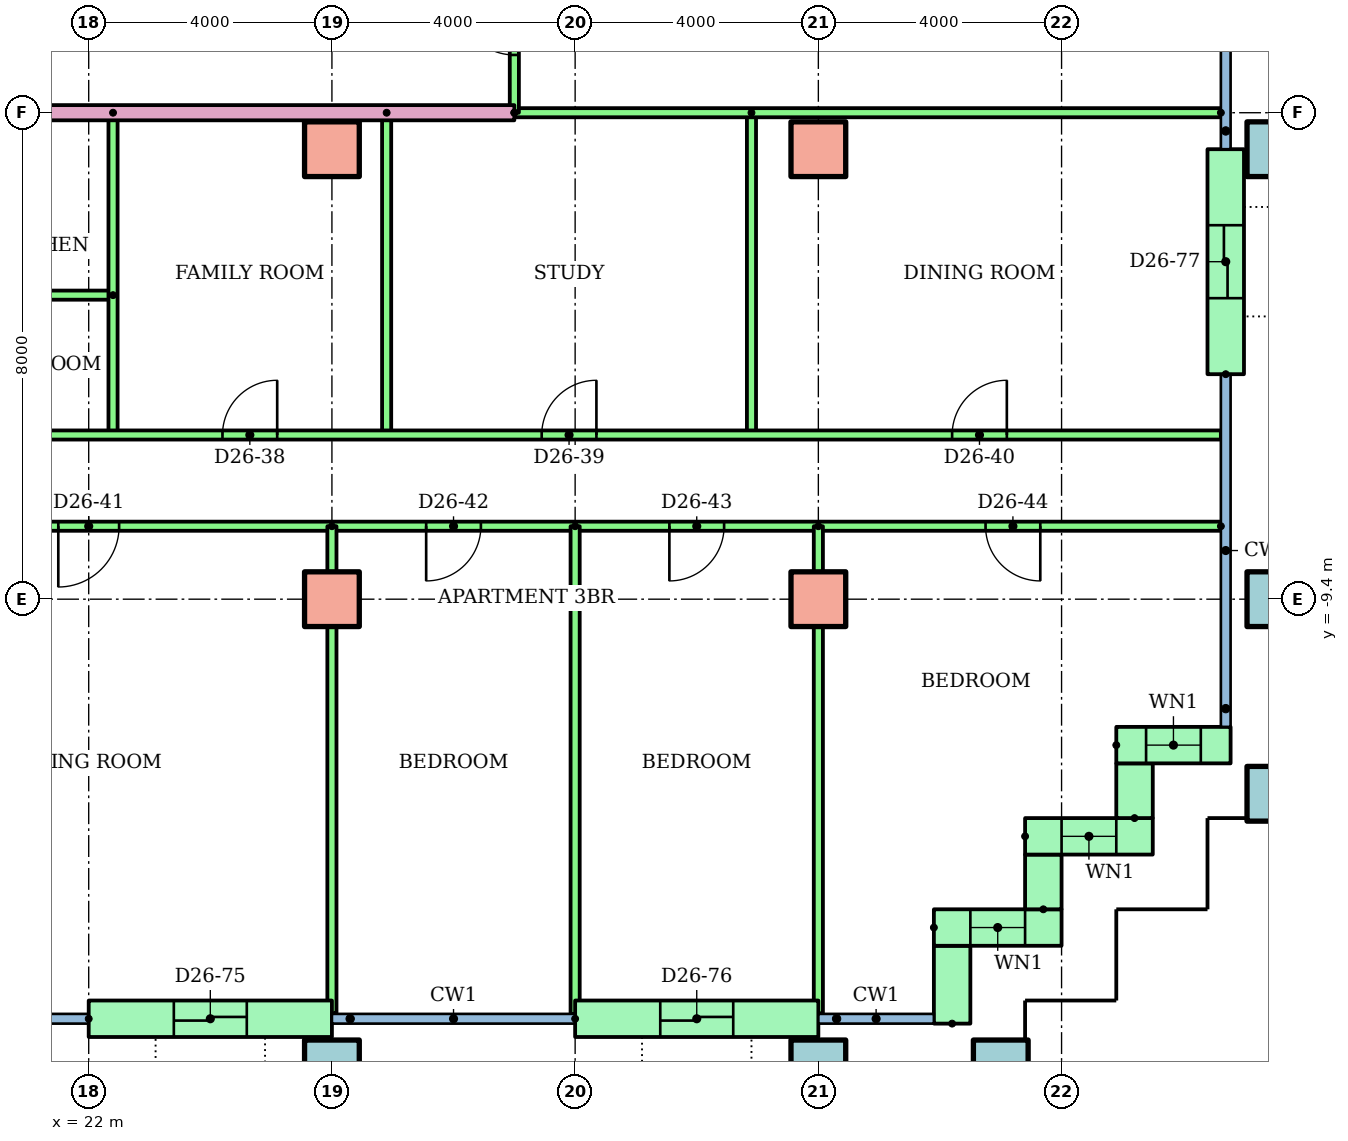
"""IFC4 building model, lengths in metres.
Left out: names, types, materials, properties, quantities, classifications, styles, units other than length and angle.
Written with IfcOpenShell. Run it as: python <this file> out.ifc"""

import sys

from ifc_helpers import new_model, si_unit, direction, frame, frame_2d, origin, origin_2d, place, context, subcontext, project, spatial, rectangle, hollow_rectangle, extrude, element, fill, save


model = new_model("IFC4")
c1 = context("Model", 3, precision=1e-05, world=origin(), true_north=direction((0.0, 1.0)))
c2 = subcontext(c1, "Body", "Model", "MODEL_VIEW")
j1 = project(units=[si_unit("LENGTHUNIT", "METRE"), si_unit("PLANEANGLEUNIT", "RADIAN")], contexts=[c1])
p1 = place(None, origin())
s1 = spatial("IfcSite", under=j1, at=p1, CompositionType="ELEMENT")
p2 = place(p1, origin())
s2 = spatial("IfcBuilding", under=s1, at=p2, CompositionType="ELEMENT")
p3 = place(p2, frame((0.0, 0.0, 99.9)))
s3 = spatial("IfcBuildingStorey", under=s2, at=p3, CompositionType="ELEMENT", Elevation=99.9)
for number, where in (
    (1, (26.0, -17.1, 0.0)),
    (2, (34.0, -17.1, 0.0)),
    (3, (37.0, -17.1, 0.0)),
    (4, (41.5, -12.6, 0.0)),
):
    element("IfcColumn", number, at=place(p3, frame(where)), inside=s3, PredefinedType="COLUMN", context=c2, shape_type="SweptSolid", body=[
        extrude(hollow_rectangle(XDim=0.9, YDim=0.9, WallThickness=0.045, at=origin_2d()), origin(), (0.0, 0.0, 1.0), 3.2),
    ])
for number, where in (
    (5, (26.0, -9.4, 0.0)),
    (6, (34.0, -9.4, 0.0)),
):
    element("IfcColumn", number, at=place(p3, frame(where)), inside=s3, PredefinedType="COLUMN", context=c2, shape_type="SweptSolid", body=[
        extrude(rectangle(XDim=0.9, YDim=0.9, at=origin_2d()), origin(), (0.0, 0.0, 1.0), 3.2),
    ])
p4 = place(p3, frame((41.5, -9.4, 0.0)))
e7 = element("IfcColumn", 7, at=p4, inside=s3, PredefinedType="COLUMN", context=c2, shape_type="SweptSolid", body=[
    extrude(hollow_rectangle(XDim=0.9, YDim=0.9, WallThickness=0.045, at=origin_2d()), origin(), (0.0, 0.0, 1.0), 3.2),
])
for number, where in (
    (8, (26.0, -2.0, 0.0)),
    (9, (34.0, -2.0, 0.0)),
):
    element("IfcColumn", number, at=place(p3, frame(where)), inside=s3, PredefinedType="COLUMN", context=c2, shape_type="SweptSolid", body=[
        extrude(rectangle(XDim=0.9, YDim=0.9, at=origin_2d()), origin(), (0.0, 0.0, 1.0), 3.2),
    ])
p5 = place(p3, frame((41.5, -2.0, 0.0)))
e10 = element("IfcColumn", 10, at=p5, inside=s3, PredefinedType="COLUMN", context=c2, shape_type="SweptSolid", body=[
    extrude(hollow_rectangle(XDim=0.9, YDim=0.9, WallThickness=0.045, at=origin_2d()), origin(), (0.0, 0.0, 1.0), 3.2),
])
p6 = place(p3, frame((22.0, -16.3, 0.0)))
e11 = element("IfcWall", 11, at=p6, inside=s3, PredefinedType="STANDARD", context=c2, shape_type="SweptSolid", body=[
    extrude(rectangle(XDim=4.0, YDim=0.6, at=frame_2d((2.0, 0.0))), origin(), (0.0, 0.0, 1.0), 2.92),
])
p7 = place(p6, frame((1.4, 0.0, 0.0)))
e12 = element("IfcOpeningElement", 12, at=p7, cuts=e11, PredefinedType="OPENING", context=c2, shape_type="SweptSolid", body=[
    extrude(rectangle(XDim=1.2, YDim=2.1, at=frame_2d((0.6, 1.05))), frame((0.0, 0.31, 0.0), z_axis=(0.0, -1.0, 0.0), x_axis=(1.0, 0.0, 0.0)), (0.0, 0.0, 1.0), 0.62),
])
p8 = place(p3, frame((30.0, -16.3, 0.0)))
e13 = element("IfcWall", 13, at=p8, inside=s3, PredefinedType="STANDARD", context=c2, shape_type="SweptSolid", body=[
    extrude(rectangle(XDim=4.0, YDim=0.6, at=frame_2d((2.0, 0.0))), origin(), (0.0, 0.0, 1.0), 2.92),
])
p9 = place(p8, frame((1.4, 0.0, 0.0)))
e14 = element("IfcOpeningElement", 14, at=p9, cuts=e13, PredefinedType="OPENING", context=c2, shape_type="SweptSolid", body=[
    extrude(rectangle(XDim=1.2, YDim=2.1, at=frame_2d((0.6, 1.05))), frame((0.0, 0.31, 0.0), z_axis=(0.0, -1.0, 0.0), x_axis=(1.0, 0.0, 0.0)), (0.0, 0.0, 1.0), 0.62),
])
p10 = place(p3, frame((36.2, -16.38, 0.0), z_axis=(0.0, 0.0, 1.0), x_axis=(0.0, 1.0, 0.0)))
e15 = element("IfcWall", 15, at=p10, inside=s3, PredefinedType="STANDARD", context=c2, shape_type="SweptSolid", body=[
    extrude(rectangle(XDim=1.28, YDim=0.6, at=frame_2d((0.64, 0.0))), origin(), (0.0, 0.0, 1.0), 2.92),
])
p11 = place(p3, frame((35.9, -14.8, 0.0)))
e16 = element("IfcWall", 16, at=p11, inside=s3, PredefinedType="STANDARD", context=c2, shape_type="SweptSolid", body=[
    extrude(rectangle(XDim=2.1, YDim=0.6, at=frame_2d((1.05, 0.0))), origin(), (0.0, 0.0, 1.0), 2.92),
])
p12 = place(p11, frame((0.6, 0.0, 0.9)))
e17 = element("IfcOpeningElement", 17, at=p12, cuts=e16, PredefinedType="OPENING", context=c2, shape_type="SweptSolid", body=[
    extrude(rectangle(XDim=0.9, YDim=1.5, at=frame_2d((0.45, 0.75))), frame((0.0, 0.31, 0.0), z_axis=(0.0, -1.0, 0.0), x_axis=(1.0, 0.0, 0.0)), (0.0, 0.0, 1.0), 0.62),
])
p13 = place(p3, frame((37.7, -14.5, 0.0), z_axis=(0.0, 0.0, 1.0), x_axis=(0.0, 1.0, 0.0)))
e18 = element("IfcWall", 18, at=p13, inside=s3, PredefinedType="STANDARD", context=c2, shape_type="SweptSolid", body=[
    extrude(rectangle(XDim=0.9, YDim=0.6, at=frame_2d((0.45, 0.0))), origin(), (0.0, 0.0, 1.0), 2.92),
])
p14 = place(p3, frame((37.4, -13.3, 0.0)))
e19 = element("IfcWall", 19, at=p14, inside=s3, PredefinedType="STANDARD", context=c2, shape_type="SweptSolid", body=[
    extrude(rectangle(XDim=2.1, YDim=0.6, at=frame_2d((1.05, 0.0))), origin(), (0.0, 0.0, 1.0), 2.92),
])
p15 = place(p14, frame((0.6, 0.0, 0.9)))
e20 = element("IfcOpeningElement", 20, at=p15, cuts=e19, PredefinedType="OPENING", context=c2, shape_type="SweptSolid", body=[
    extrude(rectangle(XDim=0.9, YDim=1.5, at=frame_2d((0.45, 0.75))), frame((0.0, 0.31, 0.0), z_axis=(0.0, -1.0, 0.0), x_axis=(1.0, 0.0, 0.0)), (0.0, 0.0, 1.0), 0.62),
])
p16 = place(p3, frame((39.2, -13.0, 0.0), z_axis=(0.0, 0.0, 1.0), x_axis=(0.0, 1.0, 0.0)))
e21 = element("IfcWall", 21, at=p16, inside=s3, PredefinedType="STANDARD", context=c2, shape_type="SweptSolid", body=[
    extrude(rectangle(XDim=0.9, YDim=0.6, at=frame_2d((0.45, 0.0))), origin(), (0.0, 0.0, 1.0), 2.92),
])
p17 = place(p3, frame((38.9, -11.8, 0.0)))
e22 = element("IfcWall", 22, at=p17, inside=s3, PredefinedType="STANDARD", context=c2, shape_type="SweptSolid", body=[
    extrude(rectangle(XDim=1.88, YDim=0.6, at=frame_2d((0.94, 0.0))), origin(), (0.0, 0.0, 1.0), 2.92),
])
p18 = place(p17, frame((0.49, 0.0, 0.9)))
e23 = element("IfcOpeningElement", 23, at=p18, cuts=e22, PredefinedType="OPENING", context=c2, shape_type="SweptSolid", body=[
    extrude(rectangle(XDim=0.9, YDim=1.5, at=frame_2d((0.45, 0.75))), frame((0.0, 0.31, 0.0), z_axis=(0.0, -1.0, 0.0), x_axis=(1.0, 0.0, 0.0)), (0.0, 0.0, 1.0), 0.62),
])
p19 = place(p3, frame((40.7, -5.7, 0.0), z_axis=(0.0, 0.0, 1.0), x_axis=(0.0, 1.0, 0.0)))
e24 = element("IfcWall", 24, at=p19, inside=s3, PredefinedType="STANDARD", context=c2, shape_type="SweptSolid", body=[
    extrude(rectangle(XDim=3.7, YDim=0.6, at=frame_2d((1.85, 0.0))), origin(), (0.0, 0.0, 1.0), 2.92),
])
p20 = place(p19, frame((1.25, 0.0, 0.0)))
e25 = element("IfcOpeningElement", 25, at=p20, cuts=e24, PredefinedType="OPENING", context=c2, shape_type="SweptSolid", body=[
    extrude(rectangle(XDim=1.2, YDim=2.1, at=frame_2d((0.6, 1.05))), frame((0.0, 0.31, 0.0), z_axis=(0.0, -1.0, 0.0), x_axis=(1.0, 0.0, 0.0)), (0.0, 0.0, 1.0), 0.62),
])
p21 = place(p3, frame((22.4, -4.4, 0.0), z_axis=(0.0, 0.0, 1.0), x_axis=(-1.0, 0.0, 0.0)))
e26 = element("IfcWall", 26, at=p21, inside=s3, PredefinedType="PARTITIONING", context=c2, shape_type="SweptSolid", body=[
    extrude(rectangle(XDim=2.4, YDim=0.15, at=frame_2d((1.2, 0.0))), origin(), (0.0, 0.0, 1.0), 2.4),
])
for number, where, z_axis, x_axis in (
    (27, (22.4, -1.4, 0.0), (0.0, 0.0, 1.0), (0.0, -1.0, 0.0)),
    (28, (26.9, -1.4, 0.0), (0.0, 0.0, 1.0), (0.0, -1.0, 0.0)),
    (29, (32.9, -1.4, 0.0), (0.0, 0.0, 1.0), (0.0, -1.0, 0.0)),
):
    element("IfcWall", number, at=place(p3, frame(where, z_axis=z_axis, x_axis=x_axis)), inside=s3, PredefinedType="PARTITIONING", context=c2, shape_type="SweptSolid", body=[
        extrude(rectangle(XDim=5.3, YDim=0.15, at=frame_2d((2.65, 0.0))), origin(), (0.0, 0.0, 1.0), 2.4),
    ])
p22 = place(p3, frame((20.0, -6.7, 0.0)))
e30 = element("IfcWall", 30, at=p22, inside=s3, PredefinedType="PARTITIONING", context=c2, shape_type="SweptSolid", body=[
    extrude(rectangle(XDim=20.62, YDim=0.15, at=frame_2d((10.31, 0.0))), origin(), (0.0, 0.0, 1.0), 2.4),
])
p23 = place(p22, frame((4.2, 0.0, 0.0)))
e31 = element("IfcOpeningElement", 31, at=p23, cuts=e30, PredefinedType="OPENING", context=c2, shape_type="SweptSolid", body=[
    extrude(rectangle(XDim=0.9, YDim=2.1, at=frame_2d((0.45, 1.05))), frame((0.0, 0.085, 0.0), z_axis=(0.0, -1.0, 0.0), x_axis=(1.0, 0.0, 0.0)), (0.0, 0.0, 1.0), 0.17),
])
p24 = place(p22, frame((9.45, 0.0, 0.0)))
e32 = element("IfcOpeningElement", 32, at=p24, cuts=e30, PredefinedType="OPENING", context=c2, shape_type="SweptSolid", body=[
    extrude(rectangle(XDim=0.9, YDim=2.1, at=frame_2d((0.45, 1.05))), frame((0.0, 0.085, 0.0), z_axis=(0.0, -1.0, 0.0), x_axis=(1.0, 0.0, 0.0)), (0.0, 0.0, 1.0), 0.17),
])
p25 = place(p22, frame((16.2, 0.0, 0.0)))
e33 = element("IfcOpeningElement", 33, at=p25, cuts=e30, PredefinedType="OPENING", context=c2, shape_type="SweptSolid", body=[
    extrude(rectangle(XDim=0.9, YDim=2.1, at=frame_2d((0.45, 1.05))), frame((0.0, 0.085, 0.0), z_axis=(0.0, -1.0, 0.0), x_axis=(1.0, 0.0, 0.0)), (0.0, 0.0, 1.0), 0.17),
])
p26 = place(p3, frame((40.62, -8.2, 0.0), z_axis=(0.0, 0.0, 1.0), x_axis=(-1.0, 0.0, 0.0)))
e34 = element("IfcWall", 34, at=p26, inside=s3, PredefinedType="PARTITIONING", context=c2, shape_type="SweptSolid", body=[
    extrude(rectangle(XDim=22.62, YDim=0.15, at=frame_2d((11.31, 0.0))), origin(), (0.0, 0.0, 1.0), 2.4),
])
p27 = place(p26, frame((18.12, 0.0, 0.0)))
e35 = element("IfcOpeningElement", 35, at=p27, cuts=e34, PredefinedType="OPENING", context=c2, shape_type="SweptSolid", body=[
    extrude(rectangle(XDim=1.0, YDim=2.1, at=frame_2d((0.5, 1.05))), frame((0.0, 0.085, 0.0), z_axis=(0.0, -1.0, 0.0), x_axis=(1.0, 0.0, 0.0)), (0.0, 0.0, 1.0), 0.17),
])
p28 = place(p26, frame((12.17, 0.0, 0.0)))
e36 = element("IfcOpeningElement", 36, at=p28, cuts=e34, PredefinedType="OPENING", context=c2, shape_type="SweptSolid", body=[
    extrude(rectangle(XDim=0.9, YDim=2.1, at=frame_2d((0.45, 1.05))), frame((0.0, 0.085, 0.0), z_axis=(0.0, -1.0, 0.0), x_axis=(1.0, 0.0, 0.0)), (0.0, 0.0, 1.0), 0.17),
])
p29 = place(p26, frame((8.17, 0.0, 0.0)))
e37 = element("IfcOpeningElement", 37, at=p29, cuts=e34, PredefinedType="OPENING", context=c2, shape_type="SweptSolid", body=[
    extrude(rectangle(XDim=0.9, YDim=2.1, at=frame_2d((0.45, 1.05))), frame((0.0, 0.085, 0.0), z_axis=(0.0, -1.0, 0.0), x_axis=(1.0, 0.0, 0.0)), (0.0, 0.0, 1.0), 0.17),
])
p30 = place(p26, frame((2.97, 0.0, 0.0)))
e38 = element("IfcOpeningElement", 38, at=p30, cuts=e34, PredefinedType="OPENING", context=c2, shape_type="SweptSolid", body=[
    extrude(rectangle(XDim=0.9, YDim=2.1, at=frame_2d((0.45, 1.05))), frame((0.0, 0.085, 0.0), z_axis=(0.0, -1.0, 0.0), x_axis=(1.0, 0.0, 0.0)), (0.0, 0.0, 1.0), 0.17),
])
p31 = place(p3, frame((26.0, -8.2, 0.0), z_axis=(0.0, 0.0, 1.0), x_axis=(0.0, -1.0, 0.0)))
e39 = element("IfcWall", 39, at=p31, inside=s3, PredefinedType="PARTITIONING", context=c2, shape_type="SweptSolid", body=[
    extrude(rectangle(XDim=8.01, YDim=0.15, at=frame_2d((4.005, 0.0))), origin(), (0.0, 0.0, 1.0), 2.4),
])
p32 = place(p3, frame((30.0, -8.2, 0.0), z_axis=(0.0, 0.0, 1.0), x_axis=(0.0, -1.0, 0.0)))
e40 = element("IfcWall", 40, at=p32, inside=s3, PredefinedType="PARTITIONING", context=c2, shape_type="SweptSolid", body=[
    extrude(rectangle(XDim=8.021, YDim=0.15, at=frame_2d((4.01, 0.0))), origin(), (0.0, 0.0, 1.0), 2.4),
])
p33 = place(p3, frame((34.0, -8.2, 0.0), z_axis=(0.0, 0.0, 1.0), x_axis=(0.0, -1.0, 0.0)))
e41 = element("IfcWall", 41, at=p33, inside=s3, PredefinedType="PARTITIONING", context=c2, shape_type="SweptSolid", body=[
    extrude(rectangle(XDim=8.01, YDim=0.15, at=frame_2d((4.005, 0.0))), origin(), (0.0, 0.0, 1.0), 2.4),
])
p34 = place(p3, frame((29.0, -1.4, 0.0), z_axis=(0.0, 0.0, 1.0), x_axis=(-1.0, 0.0, 0.0)))
e42 = element("IfcWall", 42, at=p34, inside=s3, PredefinedType="PARTITIONING", context=c2, shape_type="SweptSolid", body=[
    extrude(rectangle(XDim=15.0, YDim=0.25, at=frame_2d((7.5, 0.0))), origin(), (0.0, 0.0, 1.0), 2.4),
])
p35 = place(p34, frame((9.311, 0.0, 0.0)))
e43 = element("IfcOpeningElement", 43, at=p35, cuts=e42, PredefinedType="OPENING", context=c2, shape_type="SweptSolid", body=[
    extrude(rectangle(XDim=1.0, YDim=2.1, at=frame_2d((0.5, 1.05))), frame((0.0, 0.135, 0.0), z_axis=(0.0, -1.0, 0.0), x_axis=(1.0, 0.0, 0.0)), (0.0, 0.0, 1.0), 0.27),
])
p36 = place(p3, frame((40.62, -1.4, 0.0), z_axis=(0.0, 0.0, 1.0), x_axis=(-1.0, 0.0, 0.0)))
e44 = element("IfcWall", 44, at=p36, inside=s3, PredefinedType="PARTITIONING", context=c2, shape_type="SweptSolid", body=[
    extrude(rectangle(XDim=11.62, YDim=0.15, at=frame_2d((5.81, 0.0))), origin(), (0.0, 0.0, 1.0), 2.4),
])
p37 = place(p3, frame((29.0, -1.4, 0.0), z_axis=(0.0, 0.0, 1.0), x_axis=(0.0, 1.0, 0.0)))
e45 = element("IfcWall", 45, at=p37, inside=s3, PredefinedType="PARTITIONING", context=c2, shape_type="SweptSolid", body=[
    extrude(rectangle(XDim=2.8, YDim=0.15, at=frame_2d((1.4, 0.0))), origin(), (0.0, 0.0, 1.0), 2.4),
])
p38 = place(p37, frame((0.95, 0.0, 0.0)))
e46 = element("IfcOpeningElement", 46, at=p38, cuts=e45, PredefinedType="OPENING", context=c2, shape_type="SweptSolid", body=[
    extrude(rectangle(XDim=0.9, YDim=2.1, at=frame_2d((0.45, 1.05))), frame((0.0, 0.085, 0.0), z_axis=(0.0, -1.0, 0.0), x_axis=(1.0, 0.0, 0.0)), (0.0, 0.0, 1.0), 0.17),
])
p39 = place(p12, origin())
e47 = element("IfcWindow", 47, at=p39, inside=s3, PartitioningType="SINGLE_PANEL", PredefinedType="WINDOW", context=c2, shape_type="SweptSolid", body=[
    extrude(rectangle(XDim=0.9, YDim=1.5, at=frame_2d((0.45, 0.75))), frame((0.0, 0.03, 0.0), z_axis=(0.0, -1.0, 0.0), x_axis=(1.0, 0.0, 0.0)), (0.0, 0.0, 1.0), 0.06),
])
fill(e17, e47)
p40 = place(p15, origin())
e48 = element("IfcWindow", 48, at=p40, inside=s3, PartitioningType="SINGLE_PANEL", PredefinedType="WINDOW", context=c2, shape_type="SweptSolid", body=[
    extrude(rectangle(XDim=0.9, YDim=1.5, at=frame_2d((0.45, 0.75))), frame((0.0, 0.03, 0.0), z_axis=(0.0, -1.0, 0.0), x_axis=(1.0, 0.0, 0.0)), (0.0, 0.0, 1.0), 0.06),
])
fill(e20, e48)
p41 = place(p18, origin())
e49 = element("IfcWindow", 49, at=p41, inside=s3, PartitioningType="SINGLE_PANEL", PredefinedType="WINDOW", context=c2, shape_type="SweptSolid", body=[
    extrude(rectangle(XDim=0.9, YDim=1.5, at=frame_2d((0.45, 0.75))), frame((0.0, 0.03, 0.0), z_axis=(0.0, -1.0, 0.0), x_axis=(1.0, 0.0, 0.0)), (0.0, 0.0, 1.0), 0.06),
])
fill(e23, e49)
p42 = place(p23, origin())
e50 = element("IfcDoor", 50, at=p42, inside=s3, OperationType="SINGLE_SWING_RIGHT", PredefinedType="DOOR", context=c2, shape_type="SweptSolid", body=[
    extrude(rectangle(XDim=0.9, YDim=2.1, at=frame_2d((0.45, 1.05))), frame((0.0, 0.025, 0.0), z_axis=(0.0, -1.0, 0.0), x_axis=(1.0, 0.0, 0.0)), (0.0, 0.0, 1.0), 0.05),
])
fill(e31, e50)
p43 = place(p24, origin())
e51 = element("IfcDoor", 51, at=p43, inside=s3, OperationType="SINGLE_SWING_RIGHT", PredefinedType="DOOR", context=c2, shape_type="SweptSolid", body=[
    extrude(rectangle(XDim=0.9, YDim=2.1, at=frame_2d((0.45, 1.05))), frame((0.0, 0.025, 0.0), z_axis=(0.0, -1.0, 0.0), x_axis=(1.0, 0.0, 0.0)), (0.0, 0.0, 1.0), 0.05),
])
fill(e32, e51)
p44 = place(p25, origin())
e52 = element("IfcDoor", 52, at=p44, inside=s3, OperationType="SINGLE_SWING_RIGHT", PredefinedType="DOOR", context=c2, shape_type="SweptSolid", body=[
    extrude(rectangle(XDim=0.9, YDim=2.1, at=frame_2d((0.45, 1.05))), frame((0.0, 0.025, 0.0), z_axis=(0.0, -1.0, 0.0), x_axis=(1.0, 0.0, 0.0)), (0.0, 0.0, 1.0), 0.05),
])
fill(e33, e52)
p45 = place(p27, origin())
e53 = element("IfcDoor", 53, at=p45, inside=s3, OperationType="SINGLE_SWING_RIGHT", PredefinedType="DOOR", context=c2, shape_type="SweptSolid", body=[
    extrude(rectangle(XDim=1.0, YDim=2.1, at=frame_2d((0.5, 1.05))), frame((0.0, 0.025, 0.0), z_axis=(0.0, -1.0, 0.0), x_axis=(1.0, 0.0, 0.0)), (0.0, 0.0, 1.0), 0.05),
])
fill(e35, e53)
p46 = place(p28, origin())
e54 = element("IfcDoor", 54, at=p46, inside=s3, OperationType="SINGLE_SWING_RIGHT", PredefinedType="DOOR", context=c2, shape_type="SweptSolid", body=[
    extrude(rectangle(XDim=0.9, YDim=2.1, at=frame_2d((0.45, 1.05))), frame((0.0, 0.025, 0.0), z_axis=(0.0, -1.0, 0.0), x_axis=(1.0, 0.0, 0.0)), (0.0, 0.0, 1.0), 0.05),
])
fill(e36, e54)
p47 = place(p29, origin())
e55 = element("IfcDoor", 55, at=p47, inside=s3, OperationType="SINGLE_SWING_RIGHT", PredefinedType="DOOR", context=c2, shape_type="SweptSolid", body=[
    extrude(rectangle(XDim=0.9, YDim=2.1, at=frame_2d((0.45, 1.05))), frame((0.0, 0.025, 0.0), z_axis=(0.0, -1.0, 0.0), x_axis=(1.0, 0.0, 0.0)), (0.0, 0.0, 1.0), 0.05),
])
fill(e37, e55)
p48 = place(p30, origin())
e56 = element("IfcDoor", 56, at=p48, inside=s3, OperationType="SINGLE_SWING_LEFT", PredefinedType="DOOR", context=c2, shape_type="SweptSolid", body=[
    extrude(rectangle(XDim=0.9, YDim=2.1, at=frame_2d((0.45, 1.05))), frame((0.0, 0.025, 0.0), z_axis=(0.0, -1.0, 0.0), x_axis=(1.0, 0.0, 0.0)), (0.0, 0.0, 1.0), 0.05),
])
fill(e38, e56)
p49 = place(p38, origin())
e57 = element("IfcDoor", 57, at=p49, inside=s3, OperationType="SINGLE_SWING_RIGHT", PredefinedType="DOOR", context=c2, shape_type="SweptSolid", body=[
    extrude(rectangle(XDim=0.9, YDim=2.1, at=frame_2d((0.45, 1.05))), frame((0.0, 0.025, 0.0), z_axis=(0.0, -1.0, 0.0), x_axis=(1.0, 0.0, 0.0)), (0.0, 0.0, 1.0), 0.05),
])
fill(e46, e57)
p50 = place(p7, origin())
e58 = element("IfcDoor", 58, at=p50, inside=s3, OperationType="SLIDING_TO_LEFT", PredefinedType="DOOR", context=c2, shape_type="SweptSolid", body=[
    extrude(rectangle(XDim=1.2, YDim=2.1, at=frame_2d((0.6, 1.05))), frame((0.0, 0.025, 0.0), z_axis=(0.0, -1.0, 0.0), x_axis=(1.0, 0.0, 0.0)), (0.0, 0.0, 1.0), 0.05),
])
fill(e12, e58)
p51 = place(p9, origin())
e59 = element("IfcDoor", 59, at=p51, inside=s3, OperationType="SLIDING_TO_LEFT", PredefinedType="DOOR", context=c2, shape_type="SweptSolid", body=[
    extrude(rectangle(XDim=1.2, YDim=2.1, at=frame_2d((0.6, 1.05))), frame((0.0, 0.025, 0.0), z_axis=(0.0, -1.0, 0.0), x_axis=(1.0, 0.0, 0.0)), (0.0, 0.0, 1.0), 0.05),
])
fill(e14, e59)
p52 = place(p20, origin())
e60 = element("IfcDoor", 60, at=p52, inside=s3, OperationType="SLIDING_TO_LEFT", PredefinedType="DOOR", context=c2, shape_type="SweptSolid", body=[
    extrude(rectangle(XDim=1.2, YDim=2.1, at=frame_2d((0.6, 1.05))), frame((0.0, 0.025, 0.0), z_axis=(0.0, -1.0, 0.0), x_axis=(1.0, 0.0, 0.0)), (0.0, 0.0, 1.0), 0.05),
])
fill(e25, e60)
save(model, sys.argv[1])
